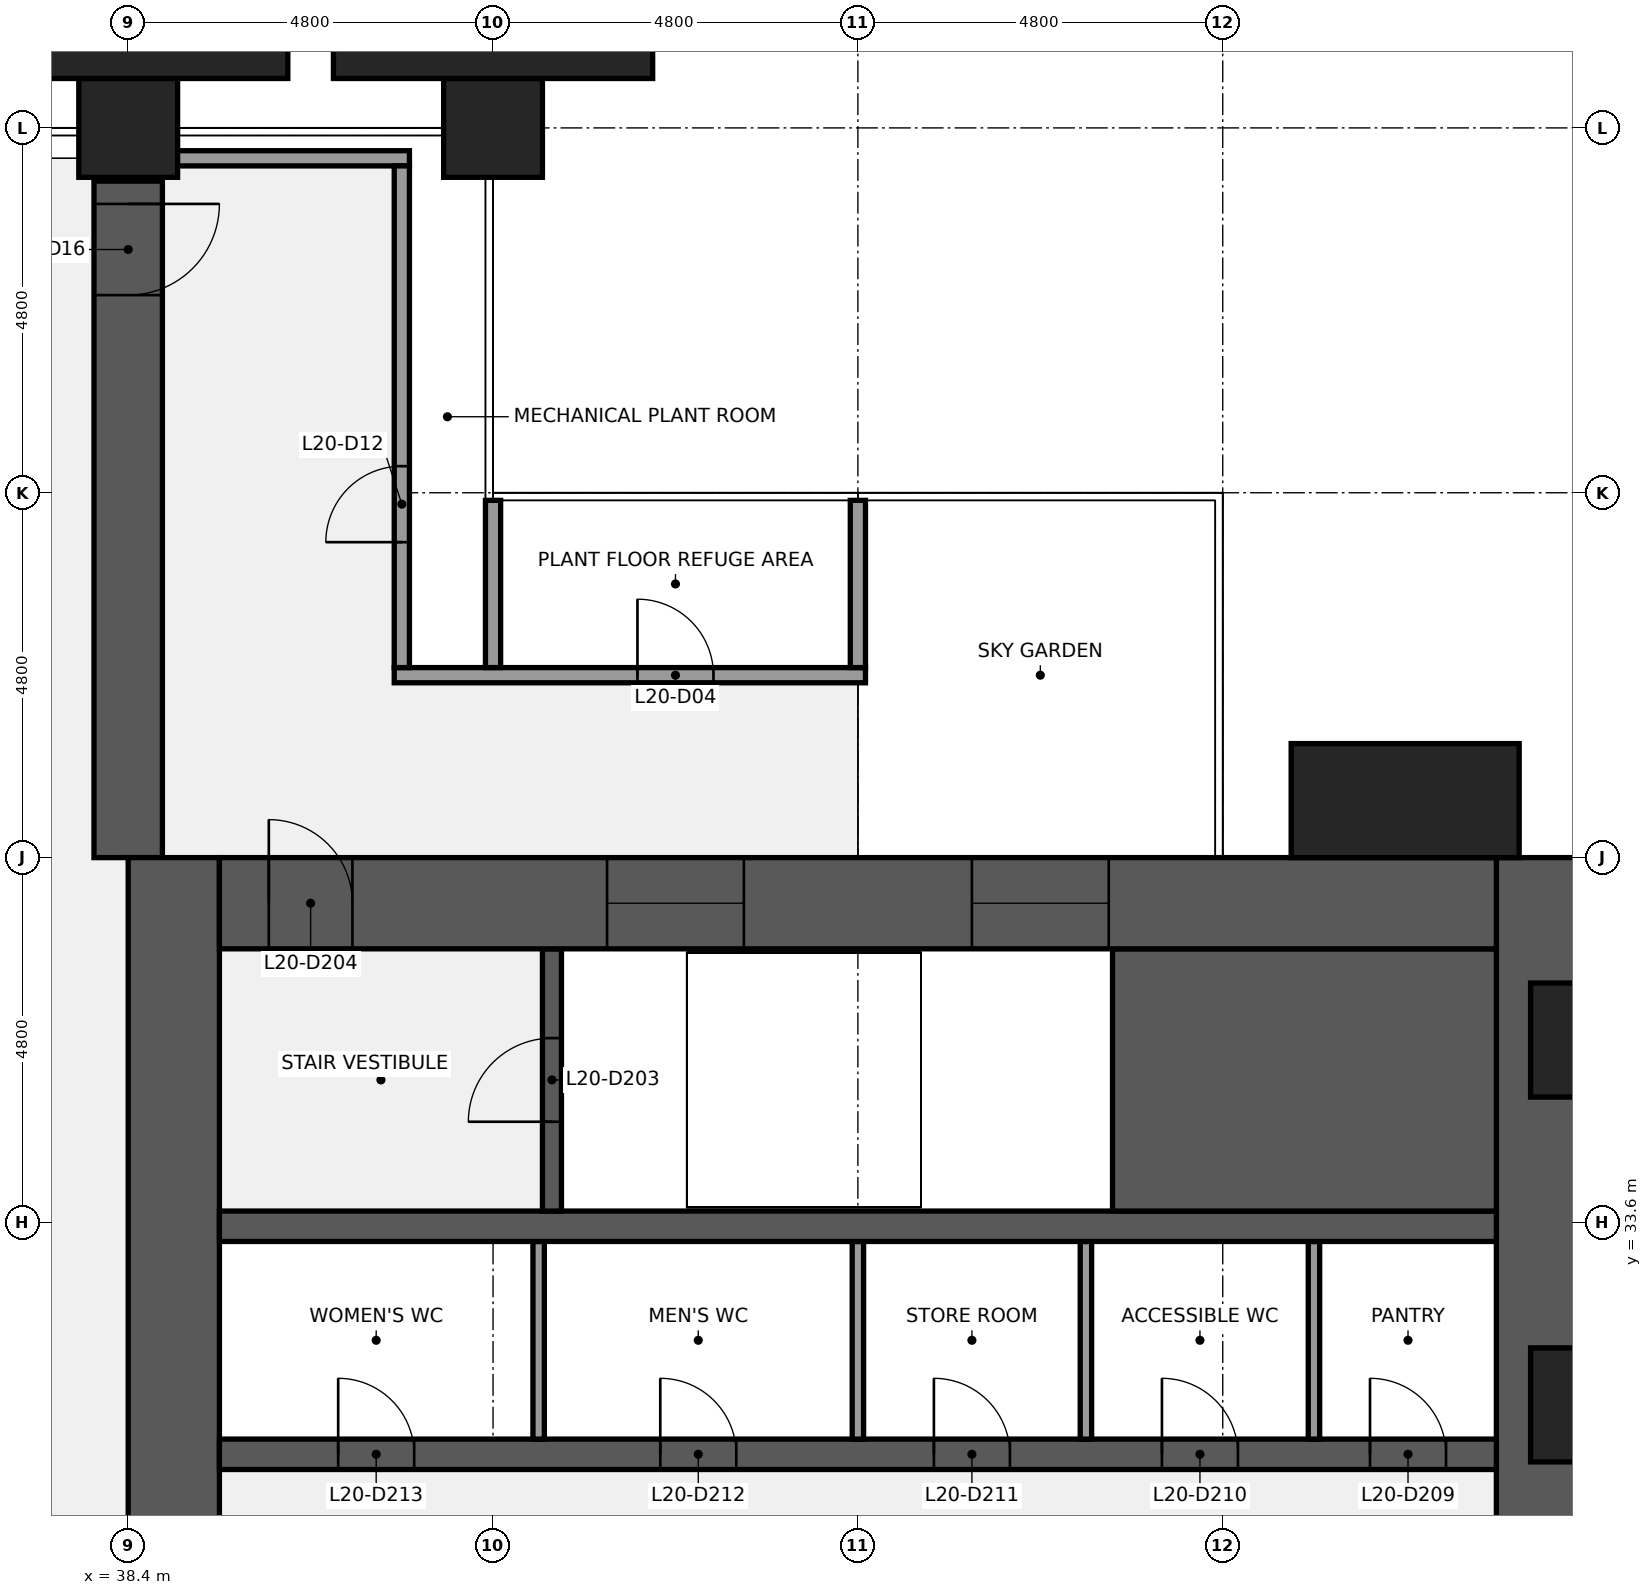
"""IFC4 building model, lengths in metres.
Left out: names, types, materials, properties, quantities, classifications, styles, units other than length and angle.
Written with IfcOpenShell. Run it as: python <this file> out.ifc"""

import sys

from ifc_helpers import new_model, si_unit, direction, frame, frame_2d, origin, origin_2d, place, context, subcontext, project, spatial, rectangle, extrude, element, fill, save


model = new_model("IFC4")
c1 = context("Model", 3, precision=1e-05, world=origin(), true_north=direction((0.0, 1.0)))
c2 = subcontext(c1, "Body", "Model", "MODEL_VIEW")
j1 = project(units=[si_unit("LENGTHUNIT", "METRE"), si_unit("PLANEANGLEUNIT", "RADIAN")], contexts=[c1])
p1 = place(None, origin())
s1 = spatial("IfcSite", under=j1, at=p1, CompositionType="ELEMENT")
p2 = place(p1, origin())
s2 = spatial("IfcBuilding", under=s1, at=p2, CompositionType="ELEMENT")
p3 = place(p2, frame((0.0, 0.0, 91.5)))
s3 = spatial("IfcBuildingStorey", under=s2, at=p3, CompositionType="ELEMENT", Elevation=91.5)
for number, where, z_axis, x_axis in (
    (1, (38.4, 48.0, 0.0), (0.0, 0.0, 1.0), (1.0, 0.0, 0.0)),
    (2, (43.2, 48.0, 0.0), (0.0, 0.0, 1.0), (1.0, 0.0, 0.0)),
):
    element("IfcColumn", number, at=place(p3, frame(where, z_axis=z_axis, x_axis=x_axis)), inside=s3, PredefinedType="COLUMN", context=c2, shape_type="SweptSolid", body=[
        extrude(rectangle(XDim=1.3, YDim=1.3, at=origin_2d()), origin(), (0.0, 0.0, 1.0), 12.6),
    ])
p4 = place(p3, frame((38.4, 38.4, 0.0), z_axis=(0.0, 0.0, 1.0), x_axis=(0.0, 1.0, 0.0)))
e3 = element("IfcWall", 3, at=p4, inside=s3, PredefinedType="SHEAR", context=c2, shape_type="SweptSolid", body=[
    extrude(rectangle(XDim=8.9, YDim=0.9, at=frame_2d((4.45, 0.0))), origin(), (0.0, 0.0, 1.0), 12.3),
])
p5 = place(p4, frame((7.4, 0.0, 0.0)))
e4 = element("IfcOpeningElement", 4, at=p5, cuts=e3, PredefinedType="OPENING", context=c2, shape_type="SweptSolid", body=[
    extrude(rectangle(XDim=1.2, YDim=2.1, at=frame_2d((0.6, 1.05))), frame((0.0, 0.46, 0.0), z_axis=(0.0, -1.0, 0.0), x_axis=(1.0, 0.0, 0.0)), (0.0, 0.0, 1.0), 0.92),
])
p6 = place(p3, frame((57.0, 38.4, 0.0), z_axis=(0.0, 0.0, 1.0), x_axis=(0.0, -1.0, 0.0)))
e5 = element("IfcWall", 5, at=p6, inside=s3, PredefinedType="SHEAR", context=c2, shape_type="SweptSolid", body=[
    extrude(rectangle(XDim=28.8, YDim=1.2, at=frame_2d((14.4, 0.0))), origin(), (0.0, 0.0, 1.0), 12.3),
])
p7 = place(p6, frame((18.45, 0.0, 0.9)))
e6 = element("IfcOpeningElement", 6, at=p7, cuts=e5, PredefinedType="OPENING", context=c2, shape_type="SweptSolid", body=[
    extrude(rectangle(XDim=1.5, YDim=6.3, at=frame_2d((0.75, 3.15))), frame((0.0, 0.61, 0.0), z_axis=(0.0, -1.0, 0.0), x_axis=(1.0, 0.0, 0.0)), (0.0, 0.0, 1.0), 1.22),
])
p8 = place(p6, frame((8.85, 0.0, 0.9)))
e7 = element("IfcOpeningElement", 7, at=p8, cuts=e5, PredefinedType="OPENING", context=c2, shape_type="SweptSolid", body=[
    extrude(rectangle(XDim=1.5, YDim=6.3, at=frame_2d((0.75, 3.15))), frame((0.0, 0.61, 0.0), z_axis=(0.0, -1.0, 0.0), x_axis=(1.0, 0.0, 0.0)), (0.0, 0.0, 1.0), 1.22),
])
p9 = place(p3, frame((39.0, 9.6, 0.0), z_axis=(0.0, 0.0, 1.0), x_axis=(0.0, 1.0, 0.0)))
e8 = element("IfcWall", 8, at=p9, inside=s3, PredefinedType="SHEAR", context=c2, shape_type="SweptSolid", body=[
    extrude(rectangle(XDim=28.8, YDim=1.2, at=frame_2d((14.4, 0.0))), origin(), (0.0, 0.0, 1.0), 12.3),
])
p10 = place(p9, frame((8.7, 0.0, 0.0)))
e9 = element("IfcOpeningElement", 9, at=p10, cuts=e8, PredefinedType="OPENING", context=c2, shape_type="SweptSolid", body=[
    extrude(rectangle(XDim=1.8, YDim=2.1, at=frame_2d((0.9, 1.05))), frame((0.0, 0.61, 0.0), z_axis=(0.0, -1.0, 0.0), x_axis=(1.0, 0.0, 0.0)), (0.0, 0.0, 1.0), 1.22),
])
p11 = place(p9, frame((18.3, 0.0, 0.0)))
e10 = element("IfcOpeningElement", 10, at=p11, cuts=e8, PredefinedType="OPENING", context=c2, shape_type="SweptSolid", body=[
    extrude(rectangle(XDim=1.8, YDim=2.1, at=frame_2d((0.9, 1.05))), frame((0.0, 0.61, 0.0), z_axis=(0.0, -1.0, 0.0), x_axis=(1.0, 0.0, 0.0)), (0.0, 0.0, 1.0), 1.22),
])
p12 = place(p3, frame((39.6, 30.55, 0.0), z_axis=(0.0, 0.0, 1.0), x_axis=(1.0, 0.0, 0.0)))
e11 = element("IfcWall", 11, at=p12, inside=s3, PredefinedType="SHEAR", context=c2, shape_type="SweptSolid", body=[
    extrude(rectangle(XDim=16.8, YDim=0.4, at=frame_2d((8.4, 0.0))), origin(), (0.0, 0.0, 1.0), 12.3),
])
p13 = place(p12, frame((15.137, 0.0, 0.0)))
e12 = element("IfcOpeningElement", 12, at=p13, cuts=e11, PredefinedType="OPENING", context=c2, shape_type="SweptSolid", body=[
    extrude(rectangle(XDim=1.0, YDim=2.1, at=frame_2d((0.5, 1.05))), frame((0.0, 0.21, 0.0), z_axis=(0.0, -1.0, 0.0), x_axis=(1.0, 0.0, 0.0)), (0.0, 0.0, 1.0), 0.42),
])
p14 = place(p12, frame((12.4, 0.0, 0.0)))
e13 = element("IfcOpeningElement", 13, at=p14, cuts=e11, PredefinedType="OPENING", context=c2, shape_type="SweptSolid", body=[
    extrude(rectangle(XDim=1.0, YDim=2.1, at=frame_2d((0.5, 1.05))), frame((0.0, 0.21, 0.0), z_axis=(0.0, -1.0, 0.0), x_axis=(1.0, 0.0, 0.0)), (0.0, 0.0, 1.0), 0.42),
])
p15 = place(p12, frame((9.4, 0.0, 0.0)))
e14 = element("IfcOpeningElement", 14, at=p15, cuts=e11, PredefinedType="OPENING", context=c2, shape_type="SweptSolid", body=[
    extrude(rectangle(XDim=1.0, YDim=2.1, at=frame_2d((0.5, 1.05))), frame((0.0, 0.21, 0.0), z_axis=(0.0, -1.0, 0.0), x_axis=(1.0, 0.0, 0.0)), (0.0, 0.0, 1.0), 0.42),
])
p16 = place(p12, frame((5.8, 0.0, 0.0)))
e15 = element("IfcOpeningElement", 15, at=p16, cuts=e11, PredefinedType="OPENING", context=c2, shape_type="SweptSolid", body=[
    extrude(rectangle(XDim=1.0, YDim=2.1, at=frame_2d((0.5, 1.05))), frame((0.0, 0.21, 0.0), z_axis=(0.0, -1.0, 0.0), x_axis=(1.0, 0.0, 0.0)), (0.0, 0.0, 1.0), 0.42),
])
p17 = place(p12, frame((1.562, 0.0, 0.0)))
e16 = element("IfcOpeningElement", 16, at=p17, cuts=e11, PredefinedType="OPENING", context=c2, shape_type="SweptSolid", body=[
    extrude(rectangle(XDim=1.0, YDim=2.1, at=frame_2d((0.5, 1.05))), frame((0.0, 0.21, 0.0), z_axis=(0.0, -1.0, 0.0), x_axis=(1.0, 0.0, 0.0)), (0.0, 0.0, 1.0), 0.42),
])
for number, where, z_axis, x_axis in (
    (17, (54.0, 30.75, 0.0), (0.0, 0.0, 1.0), (0.0, 1.0, 0.0)),
    (18, (51.0, 30.75, 0.0), (0.0, 0.0, 1.0), (0.0, 1.0, 0.0)),
    (19, (48.0, 30.75, 0.0), (0.0, 0.0, 1.0), (0.0, 1.0, 0.0)),
    (20, (43.8, 30.75, 0.0), (0.0, 0.0, 1.0), (0.0, 1.0, 0.0)),
):
    element("IfcWall", number, at=place(p3, frame(where, z_axis=z_axis, x_axis=x_axis)), inside=s3, PredefinedType="PARTITIONING", context=c2, shape_type="SweptSolid", body=[
        extrude(rectangle(XDim=2.6, YDim=0.15, at=frame_2d((1.3, 0.0))), origin(), (0.0, 0.0, 1.0), 12.3),
    ])
p18 = place(p3, frame((39.6, 33.55, 0.0), z_axis=(0.0, 0.0, 1.0), x_axis=(1.0, 0.0, 0.0)))
e21 = element("IfcWall", 21, at=p18, inside=s3, PredefinedType="SHEAR", context=c2, shape_type="SweptSolid", body=[
    extrude(rectangle(XDim=16.8, YDim=0.4, at=frame_2d((8.4, 0.0))), origin(), (0.0, 0.0, 1.0), 12.3),
])
p19 = place(p3, frame((51.35, 35.475, 0.0), z_axis=(0.0, 0.0, 1.0), x_axis=(1.0, 0.0, 0.0)))
e22 = element("IfcWall", 22, at=p19, inside=s3, PredefinedType="SHEAR", context=c2, shape_type="SweptSolid", body=[
    extrude(rectangle(XDim=5.05, YDim=3.45, at=frame_2d((2.525, 0.0))), origin(), (0.0, 0.0, 1.0), 12.3),
])
p20 = place(p3, frame((43.975, 33.75, 0.0), z_axis=(0.0, 0.0, 1.0), x_axis=(0.0, 1.0, 0.0)))
e23 = element("IfcWall", 23, at=p20, inside=s3, PredefinedType="SHEAR", context=c2, shape_type="SweptSolid", body=[
    extrude(rectangle(XDim=3.45, YDim=0.25, at=frame_2d((1.725, 0.0))), origin(), (0.0, 0.0, 1.0), 12.3),
])
p21 = place(p20, frame((1.175, 0.0, 0.0)))
e24 = element("IfcOpeningElement", 24, at=p21, cuts=e23, PredefinedType="OPENING", context=c2, shape_type="SweptSolid", body=[
    extrude(rectangle(XDim=1.1, YDim=2.1, at=frame_2d((0.55, 1.05))), frame((0.0, 0.135, 0.0), z_axis=(0.0, -1.0, 0.0), x_axis=(1.0, 0.0, 0.0)), (0.0, 0.0, 1.0), 0.27),
])
p22 = place(p3, frame((39.6, 37.8, 0.0), z_axis=(0.0, 0.0, 1.0), x_axis=(1.0, 0.0, 0.0)))
e25 = element("IfcWall", 25, at=p22, inside=s3, PredefinedType="SHEAR", context=c2, shape_type="SweptSolid", body=[
    extrude(rectangle(XDim=16.8, YDim=1.2, at=frame_2d((8.4, 0.0))), origin(), (0.0, 0.0, 1.0), 12.3),
])
p23 = place(p22, frame((0.65, 0.0, 0.0)))
e26 = element("IfcOpeningElement", 26, at=p23, cuts=e25, PredefinedType="OPENING", context=c2, shape_type="SweptSolid", body=[
    extrude(rectangle(XDim=1.1, YDim=2.1, at=frame_2d((0.55, 1.05))), frame((0.0, 0.61, 0.0), z_axis=(0.0, -1.0, 0.0), x_axis=(1.0, 0.0, 0.0)), (0.0, 0.0, 1.0), 1.22),
])
p24 = place(p22, frame((9.9, 0.0, 0.9)))
e27 = element("IfcOpeningElement", 27, at=p24, cuts=e25, PredefinedType="OPENING", context=c2, shape_type="SweptSolid", body=[
    extrude(rectangle(XDim=1.8, YDim=1.5, at=frame_2d((0.9, 0.75))), frame((0.0, 0.61, 0.0), z_axis=(0.0, -1.0, 0.0), x_axis=(1.0, 0.0, 0.0)), (0.0, 0.0, 1.0), 1.22),
])
p25 = place(p22, frame((5.1, 0.0, 0.9)))
e28 = element("IfcOpeningElement", 28, at=p25, cuts=e25, PredefinedType="OPENING", context=c2, shape_type="SweptSolid", body=[
    extrude(rectangle(XDim=1.8, YDim=1.5, at=frame_2d((0.9, 0.75))), frame((0.0, 0.61, 0.0), z_axis=(0.0, -1.0, 0.0), x_axis=(1.0, 0.0, 0.0)), (0.0, 0.0, 1.0), 1.22),
])
p26 = place(p3, frame((41.9, 40.8, 0.0), z_axis=(0.0, 0.0, 1.0), x_axis=(1.0, 0.0, 0.0)))
e29 = element("IfcWall", 29, at=p26, inside=s3, PredefinedType="PARTITIONING", context=c2, shape_type="SweptSolid", body=[
    extrude(rectangle(XDim=6.2, YDim=0.2, at=frame_2d((3.1, 0.0))), origin(), (0.0, 0.0, 1.0), 11.309),
])
p27 = place(p26, frame((3.2, 0.0, 0.0)))
e30 = element("IfcOpeningElement", 30, at=p27, cuts=e29, PredefinedType="OPENING", context=c2, shape_type="SweptSolid", body=[
    extrude(rectangle(XDim=1.0, YDim=2.1, at=frame_2d((0.5, 1.05))), frame((0.0, 0.11, 0.0), z_axis=(0.0, -1.0, 0.0), x_axis=(1.0, 0.0, 0.0)), (0.0, 0.0, 1.0), 0.22),
])
p28 = place(p3, frame((38.3, 47.6, 0.0), z_axis=(0.0, 0.0, 1.0), x_axis=(1.0, 0.0, 0.0)))
e31 = element("IfcWall", 31, at=p28, inside=s3, PredefinedType="PARTITIONING", context=c2, shape_type="SweptSolid", body=[
    extrude(rectangle(XDim=3.8, YDim=0.2, at=frame_2d((1.9, 0.0))), origin(), (0.0, 0.0, 1.0), 11.309),
])
p29 = place(p3, frame((42.0, 40.9, 0.0), z_axis=(0.0, 0.0, 1.0), x_axis=(0.0, 1.0, 0.0)))
e32 = element("IfcWall", 32, at=p29, inside=s3, PredefinedType="PARTITIONING", context=c2, shape_type="SweptSolid", body=[
    extrude(rectangle(XDim=6.6, YDim=0.2, at=frame_2d((3.3, 0.0))), origin(), (0.0, 0.0, 1.0), 11.309),
])
p30 = place(p29, frame((1.65, 0.0, 0.0)))
e33 = element("IfcOpeningElement", 33, at=p30, cuts=e32, PredefinedType="OPENING", context=c2, shape_type="SweptSolid", body=[
    extrude(rectangle(XDim=1.0, YDim=2.1, at=frame_2d((0.5, 1.05))), frame((0.0, 0.11, 0.0), z_axis=(0.0, -1.0, 0.0), x_axis=(1.0, 0.0, 0.0)), (0.0, 0.0, 1.0), 0.22),
])
for number, where, z_axis, x_axis in (
    (34, (43.2, 40.9, 0.0), (0.0, 0.0, 1.0), (0.0, 1.0, 0.0)),
    (35, (48.0, 40.9, 0.0), (0.0, 0.0, 1.0), (0.0, 1.0, 0.0)),
):
    element("IfcWall", number, at=place(p3, frame(where, z_axis=z_axis, x_axis=x_axis)), inside=s3, PredefinedType="PARTITIONING", context=c2, shape_type="SweptSolid", body=[
        extrude(rectangle(XDim=2.2, YDim=0.2, at=frame_2d((1.1, 0.0))), origin(), (0.0, 0.0, 1.0), 11.309),
    ])
p31 = place(p3, frame((55.2, 39.15, 0.0), z_axis=(0.0, 0.0, 1.0), x_axis=(1.0, 0.0, 0.0)))
e36 = element("IfcColumn", 36, at=p31, inside=s3, PredefinedType="PILASTER", context=c2, shape_type="SweptSolid", body=[
    extrude(rectangle(XDim=3.0, YDim=1.5, at=origin_2d()), origin(), (0.0, 0.0, 1.0), 12.6),
])
for number, where, z_axis, x_axis in (
    (37, (38.4, 49.075, 0.0), (0.0, 0.0, 1.0), (1.0, 0.0, 0.0)),
    (38, (43.2, 49.075, 0.0), (0.0, 0.0, 1.0), (1.0, 0.0, 0.0)),
):
    element("IfcColumn", number, at=place(p3, frame(where, z_axis=z_axis, x_axis=x_axis)), inside=s3, PredefinedType="PILASTER", context=c2, shape_type="SweptSolid", body=[
        extrude(rectangle(XDim=4.2, YDim=0.85, at=origin_2d()), origin(), (0.0, 0.0, 1.0), 12.6),
    ])
p32 = place(p21, origin())
e39 = element("IfcDoor", 39, at=p32, inside=s3, OperationType="SINGLE_SWING_LEFT", PredefinedType="DOOR", context=c2, shape_type="SweptSolid", body=[
    extrude(rectangle(XDim=1.1, YDim=2.1, at=frame_2d((0.55, 1.05))), frame((0.0, 0.025, 0.0), z_axis=(0.0, -1.0, 0.0), x_axis=(1.0, 0.0, 0.0)), (0.0, 0.0, 1.0), 0.05),
])
fill(e24, e39)
p33 = place(p23, origin())
e40 = element("IfcDoor", 40, at=p33, inside=s3, OperationType="SINGLE_SWING_LEFT", PredefinedType="DOOR", context=c2, shape_type="SweptSolid", body=[
    extrude(rectangle(XDim=1.1, YDim=2.1, at=frame_2d((0.55, 1.05))), frame((0.0, 0.025, 0.0), z_axis=(0.0, -1.0, 0.0), x_axis=(1.0, 0.0, 0.0)), (0.0, 0.0, 1.0), 0.05),
])
fill(e26, e40)
p34 = place(p13, origin())
e41 = element("IfcDoor", 41, at=p34, inside=s3, OperationType="SINGLE_SWING_LEFT", PredefinedType="DOOR", context=c2, shape_type="SweptSolid", body=[
    extrude(rectangle(XDim=1.0, YDim=2.1, at=frame_2d((0.5, 1.05))), frame((0.0, 0.025, 0.0), z_axis=(0.0, -1.0, 0.0), x_axis=(1.0, 0.0, 0.0)), (0.0, 0.0, 1.0), 0.05),
])
fill(e12, e41)
p35 = place(p14, origin())
e42 = element("IfcDoor", 42, at=p35, inside=s3, OperationType="SINGLE_SWING_LEFT", PredefinedType="DOOR", context=c2, shape_type="SweptSolid", body=[
    extrude(rectangle(XDim=1.0, YDim=2.1, at=frame_2d((0.5, 1.05))), frame((0.0, 0.025, 0.0), z_axis=(0.0, -1.0, 0.0), x_axis=(1.0, 0.0, 0.0)), (0.0, 0.0, 1.0), 0.05),
])
fill(e13, e42)
p36 = place(p15, origin())
e43 = element("IfcDoor", 43, at=p36, inside=s3, OperationType="SINGLE_SWING_LEFT", PredefinedType="DOOR", context=c2, shape_type="SweptSolid", body=[
    extrude(rectangle(XDim=1.0, YDim=2.1, at=frame_2d((0.5, 1.05))), frame((0.0, 0.025, 0.0), z_axis=(0.0, -1.0, 0.0), x_axis=(1.0, 0.0, 0.0)), (0.0, 0.0, 1.0), 0.05),
])
fill(e14, e43)
p37 = place(p16, origin())
e44 = element("IfcDoor", 44, at=p37, inside=s3, OperationType="SINGLE_SWING_LEFT", PredefinedType="DOOR", context=c2, shape_type="SweptSolid", body=[
    extrude(rectangle(XDim=1.0, YDim=2.1, at=frame_2d((0.5, 1.05))), frame((0.0, 0.025, 0.0), z_axis=(0.0, -1.0, 0.0), x_axis=(1.0, 0.0, 0.0)), (0.0, 0.0, 1.0), 0.05),
])
fill(e15, e44)
p38 = place(p17, origin())
e45 = element("IfcDoor", 45, at=p38, inside=s3, OperationType="SINGLE_SWING_LEFT", PredefinedType="DOOR", context=c2, shape_type="SweptSolid", body=[
    extrude(rectangle(XDim=1.0, YDim=2.1, at=frame_2d((0.5, 1.05))), frame((0.0, 0.025, 0.0), z_axis=(0.0, -1.0, 0.0), x_axis=(1.0, 0.0, 0.0)), (0.0, 0.0, 1.0), 0.05),
])
fill(e16, e45)
p39 = place(p24, origin())
e46 = element("IfcWindow", 46, at=p39, inside=s3, PartitioningType="SINGLE_PANEL", PredefinedType="WINDOW", context=c2, shape_type="SweptSolid", body=[
    extrude(rectangle(XDim=1.8, YDim=1.5, at=frame_2d((0.9, 0.75))), frame((0.0, 0.03, 0.0), z_axis=(0.0, -1.0, 0.0), x_axis=(1.0, 0.0, 0.0)), (0.0, 0.0, 1.0), 0.06),
])
fill(e27, e46)
p40 = place(p25, origin())
e47 = element("IfcWindow", 47, at=p40, inside=s3, PartitioningType="SINGLE_PANEL", PredefinedType="WINDOW", context=c2, shape_type="SweptSolid", body=[
    extrude(rectangle(XDim=1.8, YDim=1.5, at=frame_2d((0.9, 0.75))), frame((0.0, 0.03, 0.0), z_axis=(0.0, -1.0, 0.0), x_axis=(1.0, 0.0, 0.0)), (0.0, 0.0, 1.0), 0.06),
])
fill(e28, e47)
p41 = place(p27, origin())
e48 = element("IfcDoor", 48, at=p41, inside=s3, OperationType="SINGLE_SWING_LEFT", PredefinedType="DOOR", context=c2, shape_type="SweptSolid", body=[
    extrude(rectangle(XDim=1.0, YDim=2.1, at=frame_2d((0.5, 1.05))), frame((0.0, 0.025, 0.0), z_axis=(0.0, -1.0, 0.0), x_axis=(1.0, 0.0, 0.0)), (0.0, 0.0, 1.0), 0.05),
])
fill(e30, e48)
p42 = place(p30, origin())
e49 = element("IfcDoor", 49, at=p42, inside=s3, OperationType="SINGLE_SWING_LEFT", PredefinedType="DOOR", context=c2, shape_type="SweptSolid", body=[
    extrude(rectangle(XDim=1.0, YDim=2.1, at=frame_2d((0.5, 1.05))), frame((0.0, 0.025, 0.0), z_axis=(0.0, -1.0, 0.0), x_axis=(1.0, 0.0, 0.0)), (0.0, 0.0, 1.0), 0.05),
])
fill(e33, e49)
p43 = place(p5, origin())
e50 = element("IfcDoor", 50, at=p43, inside=s3, OperationType="SINGLE_SWING_RIGHT", PredefinedType="DOOR", context=c2, shape_type="SweptSolid", body=[
    extrude(rectangle(XDim=1.2, YDim=2.1, at=frame_2d((0.6, 1.05))), frame((0.0, 0.025, 0.0), z_axis=(0.0, -1.0, 0.0), x_axis=(1.0, 0.0, 0.0)), (0.0, 0.0, 1.0), 0.05),
])
fill(e4, e50)
save(model, sys.argv[1])
